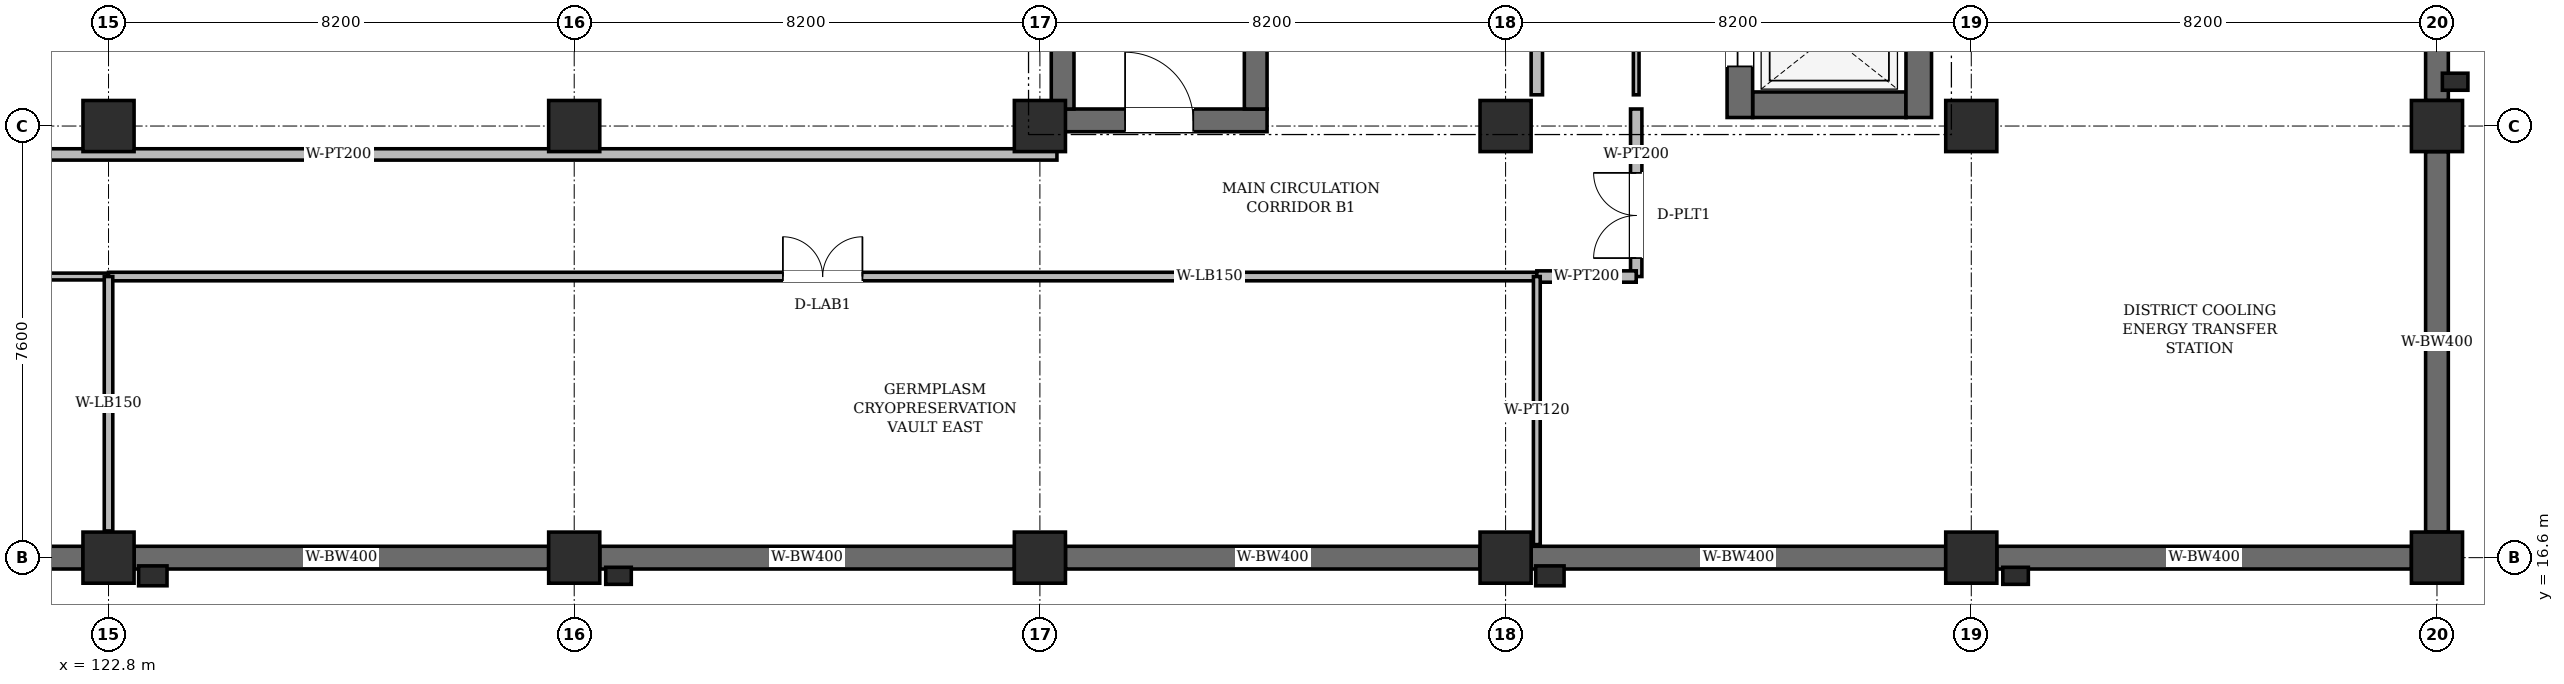
"""IFC4 building model, lengths in metres.
Left out: names, types, materials, properties, quantities, classifications, styles, units other than length and angle.
Written with IfcOpenShell. Run it as: python <this file> out.ifc"""

import sys

from ifc_helpers import new_model, si_unit, direction, frame, frame_2d, origin, origin_2d, place, context, subcontext, project, spatial, rectangle, extrude, element, fill, save


model = new_model("IFC4")
c1 = context("Model", 3, precision=1e-05, world=origin(), true_north=direction((0.0, 1.0)))
c2 = subcontext(c1, "Body", "Model", "MODEL_VIEW")
j1 = project(units=[si_unit("LENGTHUNIT", "METRE"), si_unit("PLANEANGLEUNIT", "RADIAN")], contexts=[c1])
p1 = place(None, origin())
s1 = spatial("IfcSite", under=j1, at=p1, CompositionType="ELEMENT")
p2 = place(p1, origin())
s2 = spatial("IfcBuilding", under=s1, at=p2, CompositionType="ELEMENT")
p3 = place(p2, frame((0.0, 0.0, -4.8)))
s3 = spatial("IfcBuildingStorey", under=s2, at=p3, CompositionType="ELEMENT", Elevation=-4.8)
for number, where, z_axis, x_axis in (
    (1, (122.8, 16.6, 0.0), (0.0, 0.0, 1.0), (1.0, 0.0, 0.0)),
    (2, (122.8, 24.2, 0.0), (0.0, 0.0, 1.0), (1.0, 0.0, 0.0)),
    (3, (131.0, 16.6, 0.0), (0.0, 0.0, 1.0), (1.0, 0.0, 0.0)),
    (4, (131.0, 24.2, 0.0), (0.0, 0.0, 1.0), (1.0, 0.0, 0.0)),
    (5, (139.2, 16.6, 0.0), (0.0, 0.0, 1.0), (1.0, 0.0, 0.0)),
    (6, (139.2, 24.2, 0.0), (0.0, 0.0, 1.0), (1.0, 0.0, 0.0)),
    (7, (147.4, 16.6, 0.0), (0.0, 0.0, 1.0), (1.0, 0.0, 0.0)),
    (8, (147.4, 24.2, 0.0), (0.0, 0.0, 1.0), (1.0, 0.0, 0.0)),
    (9, (155.6, 16.6, 0.0), (0.0, 0.0, 1.0), (1.0, 0.0, 0.0)),
    (10, (155.6, 24.2, 0.0), (0.0, 0.0, 1.0), (1.0, 0.0, 0.0)),
    (11, (163.8, 16.6, 0.0), (0.0, 0.0, 1.0), (1.0, 0.0, 0.0)),
    (12, (163.8, 24.2, 0.0), (0.0, 0.0, 1.0), (1.0, 0.0, 0.0)),
):
    element("IfcColumn", number, at=place(p3, frame(where, z_axis=z_axis, x_axis=x_axis)), inside=s3, PredefinedType="COLUMN", context=c2, shape_type="SweptSolid", body=[
        extrude(rectangle(XDim=0.9, YDim=0.9, at=origin_2d()), origin(), (0.0, 0.0, 1.0), 4.46),
    ])
p4 = place(p3, frame((123.58, 16.28, 0.0), z_axis=(0.0, 0.0, 1.0), x_axis=(1.0, 0.0, 0.0)))
e13 = element("IfcColumn", 13, at=p4, inside=s3, PredefinedType="PILASTER", context=c2, shape_type="SweptSolid", body=[
    extrude(rectangle(XDim=0.5, YDim=0.35, at=origin_2d()), origin(), (0.0, 0.0, 1.0), 4.565),
])
p5 = place(p3, frame((131.78, 16.28, 0.0), z_axis=(0.0, 0.0, 1.0), x_axis=(1.0, 0.0, 0.0)))
e14 = element("IfcColumn", 14, at=p5, inside=s3, PredefinedType="PILASTER", context=c2, shape_type="SweptSolid", body=[
    extrude(rectangle(XDim=0.45, YDim=0.3, at=origin_2d()), origin(), (0.0, 0.0, 1.0), 4.565),
])
p6 = place(p3, frame((148.18, 16.28, 0.0), z_axis=(0.0, 0.0, 1.0), x_axis=(1.0, 0.0, 0.0)))
e15 = element("IfcColumn", 15, at=p6, inside=s3, PredefinedType="PILASTER", context=c2, shape_type="SweptSolid", body=[
    extrude(rectangle(XDim=0.5, YDim=0.35, at=origin_2d()), origin(), (0.0, 0.0, 1.0), 4.565),
])
for number, where, z_axis, x_axis in (
    (16, (156.38, 16.28, 0.0), (0.0, 0.0, 1.0), (1.0, 0.0, 0.0)),
    (17, (164.12, 24.98, 0.0), (0.0, 0.0, 1.0), (1.0, 0.0, 0.0)),
):
    element("IfcColumn", number, at=place(p3, frame(where, z_axis=z_axis, x_axis=x_axis)), inside=s3, PredefinedType="PILASTER", context=c2, shape_type="SweptSolid", body=[
        extrude(rectangle(XDim=0.45, YDim=0.3, at=origin_2d()), origin(), (0.0, 0.0, 1.0), 4.565),
    ])
p7 = place(p3, frame((163.8, 17.05, 0.0), z_axis=(0.0, 0.0, 1.0), x_axis=(0.0, 1.0, 0.0)))
e18 = element("IfcWall", 18, at=p7, inside=s3, PredefinedType="SOLIDWALL", context=c2, shape_type="SweptSolid", body=[
    extrude(rectangle(XDim=6.7, YDim=0.4, at=frame_2d((3.35, 0.0))), origin(), (0.0, 0.0, 1.0), 4.46),
])
p8 = place(p3, frame((163.8, 24.65, 0.0), z_axis=(0.0, 0.0, 1.0), x_axis=(0.0, 1.0, 0.0)))
e19 = element("IfcWall", 19, at=p8, inside=s3, PredefinedType="SOLIDWALL", context=c2, shape_type="SweptSolid", body=[
    extrude(rectangle(XDim=6.7, YDim=0.4, at=frame_2d((3.35, 0.0))), origin(), (0.0, 0.0, 1.0), 4.46),
])
p9 = place(p3, frame((114.975, 16.6, 0.0), z_axis=(0.0, 0.0, 1.0), x_axis=(1.0, 0.0, 0.0)))
e20 = element("IfcWall", 20, at=p9, inside=s3, PredefinedType="SOLIDWALL", context=c2, shape_type="SweptSolid", body=[
    extrude(rectangle(XDim=7.375, YDim=0.4, at=frame_2d((3.688, 0.0))), origin(), (0.0, 0.0, 1.0), 4.46),
])
for number, where, z_axis, x_axis in (
    (21, (123.25, 16.6, 0.0), (0.0, 0.0, 1.0), (1.0, 0.0, 0.0)),
    (22, (131.45, 16.6, 0.0), (0.0, 0.0, 1.0), (1.0, 0.0, 0.0)),
    (23, (139.65, 16.6, 0.0), (0.0, 0.0, 1.0), (1.0, 0.0, 0.0)),
):
    element("IfcWall", number, at=place(p3, frame(where, z_axis=z_axis, x_axis=x_axis)), inside=s3, PredefinedType="SOLIDWALL", context=c2, shape_type="SweptSolid", body=[
        extrude(rectangle(XDim=7.3, YDim=0.4, at=frame_2d((3.65, 0.0))), origin(), (0.0, 0.0, 1.0), 4.46),
    ])
p10 = place(p3, frame((147.85, 16.6, 0.0), z_axis=(0.0, 0.0, 1.0), x_axis=(1.0, 0.0, 0.0)))
e24 = element("IfcWall", 24, at=p10, inside=s3, PredefinedType="SOLIDWALL", context=c2, shape_type="SweptSolid", body=[
    extrude(rectangle(XDim=7.3, YDim=0.4, at=frame_2d((3.65, 0.0))), origin(), (0.0, 0.0, 1.0), 4.46),
])
p11 = place(p3, frame((156.05, 16.6, 0.0), z_axis=(0.0, 0.0, 1.0), x_axis=(1.0, 0.0, 0.0)))
e25 = element("IfcWall", 25, at=p11, inside=s3, PredefinedType="SOLIDWALL", context=c2, shape_type="SweptSolid", body=[
    extrude(rectangle(XDim=7.3, YDim=0.4, at=frame_2d((3.65, 0.0))), origin(), (0.0, 0.0, 1.0), 4.46),
])
p12 = place(p3, frame((139.4, 24.3, 0.0), z_axis=(0.0, 0.0, 1.0), x_axis=(1.0, 0.0, 0.0)))
e26 = element("IfcWall", 26, at=p12, inside=s3, PredefinedType="SHEAR", context=c2, shape_type="SweptSolid", body=[
    extrude(rectangle(XDim=3.8, YDim=0.4, at=frame_2d((1.9, 0.0))), origin(), (0.0, 0.0, 1.0), 4.46),
])
p13 = place(p12, frame((1.3, 0.0, 0.0)))
e27 = element("IfcOpeningElement", 27, at=p13, cuts=e26, PredefinedType="OPENING", context=c2, shape_type="SweptSolid", body=[
    extrude(rectangle(XDim=1.2, YDim=2.2, at=frame_2d((0.6, 1.1))), frame((0.0, 0.212, 0.0), z_axis=(0.0, -1.0, 0.0), x_axis=(1.0, 0.0, 0.0)), (0.0, 0.0, 1.0), 0.424),
])
for number, where, z_axis, x_axis in (
    (28, (139.6, 24.5, 0.0), (0.0, 0.0, 1.0), (0.0, 1.0, 0.0)),
    (29, (143.0, 24.5, 0.0), (0.0, 0.0, 1.0), (0.0, 1.0, 0.0)),
):
    element("IfcWall", number, at=place(p3, frame(where, z_axis=z_axis, x_axis=x_axis)), inside=s3, PredefinedType="SHEAR", context=c2, shape_type="SweptSolid", body=[
        extrude(rectangle(XDim=7.0, YDim=0.4, at=frame_2d((3.5, 0.0))), origin(), (0.0, 0.0, 1.0), 4.46),
    ])
p14 = place(p3, frame((151.75, 24.575, 0.0), z_axis=(0.0, 0.0, 1.0), x_axis=(1.0, 0.0, 0.0)))
e30 = element("IfcWall", 30, at=p14, inside=s3, PredefinedType="SHEAR", context=c2, shape_type="SweptSolid", body=[
    extrude(rectangle(XDim=2.7, YDim=0.45, at=frame_2d((1.35, 0.0))), origin(), (0.0, 0.0, 1.0), 4.46),
])
p15 = place(p3, frame((151.525, 24.35, 0.0), z_axis=(0.0, 0.0, 1.0), x_axis=(0.0, 1.0, 0.0)))
e31 = element("IfcWall", 31, at=p15, inside=s3, PredefinedType="SHEAR", context=c2, shape_type="SweptSolid", body=[
    extrude(rectangle(XDim=2.9, YDim=0.45, at=frame_2d((1.45, 0.0))), origin(), (0.0, 0.0, 1.0), 4.46),
])
p16 = place(p15, frame((0.9, 0.0, 0.0)))
e32 = element("IfcOpeningElement", 32, at=p16, cuts=e31, PredefinedType="OPENING", context=c2, shape_type="SweptSolid", body=[
    extrude(rectangle(XDim=1.1, YDim=2.2, at=frame_2d((0.55, 1.1))), frame((0.0, 0.237, 0.0), z_axis=(0.0, -1.0, 0.0), x_axis=(1.0, 0.0, 0.0)), (0.0, 0.0, 1.0), 0.474),
])
p17 = place(p3, frame((154.675, 24.35, 0.0), z_axis=(0.0, 0.0, 1.0), x_axis=(0.0, 1.0, 0.0)))
e33 = element("IfcWall", 33, at=p17, inside=s3, PredefinedType="SHEAR", context=c2, shape_type="SweptSolid", body=[
    extrude(rectangle(XDim=2.9, YDim=0.45, at=frame_2d((1.45, 0.0))), origin(), (0.0, 0.0, 1.0), 4.46),
])
p18 = place(p3, frame((147.95, 31.75, 0.0), z_axis=(0.0, 0.0, 1.0), x_axis=(0.0, -1.0, 0.0)))
e34 = element("IfcWall", 34, at=p18, inside=s3, PredefinedType="PARTITIONING", context=c2, shape_type="SweptSolid", body=[
    extrude(rectangle(XDim=7.0, YDim=0.2, at=frame_2d((3.5, 0.0))), origin(), (0.0, 0.0, 1.0), 4.405),
])
p19 = place(p18, frame((2.75, 0.0, 0.0)))
e35 = element("IfcOpeningElement", 35, at=p19, cuts=e34, PredefinedType="OPENING", context=c2, shape_type="SweptSolid", body=[
    extrude(rectangle(XDim=1.5, YDim=2.2, at=frame_2d((0.75, 1.1))), frame((0.0, 0.112, 0.0), z_axis=(0.0, -1.0, 0.0), x_axis=(1.0, 0.0, 0.0)), (0.0, 0.0, 1.0), 0.224),
])
p20 = place(p3, frame((149.7, 24.75, 0.0), z_axis=(0.0, 0.0, 1.0), x_axis=(0.0, 1.0, 0.0)))
e36 = element("IfcWall", 36, at=p20, inside=s3, PredefinedType="PARTITIONING", context=c2, shape_type="SweptSolid", body=[
    extrude(rectangle(XDim=11.3, YDim=0.1, at=frame_2d((5.65, 0.0))), origin(), (0.0, 0.0, 1.0), 4.405),
])
p21 = place(p20, frame((4.75, 0.0, 0.0)))
e37 = element("IfcOpeningElement", 37, at=p21, cuts=e36, PredefinedType="OPENING", context=c2, shape_type="SweptSolid", body=[
    extrude(rectangle(XDim=1.8, YDim=2.4, at=frame_2d((0.9, 1.2))), frame((0.0, 0.062, 0.0), z_axis=(0.0, -1.0, 0.0), x_axis=(1.0, 0.0, 0.0)), (0.0, 0.0, 1.0), 0.124),
])
p22 = place(p3, frame((122.8, 21.55, 0.0), z_axis=(0.0, 0.0, 1.0), x_axis=(-1.0, 0.0, 0.0)))
e38 = element("IfcWall", 38, at=p22, inside=s3, PredefinedType="PARTITIONING", context=c2, shape_type="SweptSolid", body=[
    extrude(rectangle(XDim=24.0, YDim=0.12, at=frame_2d((12.0, 0.0))), origin(), (0.0, 0.0, 1.0), 3.885),
])
p23 = place(p22, frame((11.475, 0.0, 0.0)))
e39 = element("IfcOpeningElement", 39, at=p23, cuts=e38, PredefinedType="OPENING", context=c2, shape_type="SweptSolid", body=[
    extrude(rectangle(XDim=1.05, YDim=2.2, at=frame_2d((0.525, 1.1))), frame((0.0, 0.072, 0.0), z_axis=(0.0, -1.0, 0.0), x_axis=(1.0, 0.0, 0.0)), (0.0, 0.0, 1.0), 0.144),
])
p24 = place(p3, frame((147.95, 21.55, 0.0), z_axis=(0.0, 0.0, 1.0), x_axis=(-1.0, 0.0, 0.0)))
e40 = element("IfcWall", 40, at=p24, inside=s3, PredefinedType="PARTITIONING", context=c2, shape_type="SweptSolid", body=[
    extrude(rectangle(XDim=25.15, YDim=0.15, at=frame_2d((12.575, 0.0))), origin(), (0.0, 0.0, 1.0), 4.035),
])
p25 = place(p24, frame((11.875, 0.0, 0.0)))
e41 = element("IfcOpeningElement", 41, at=p25, cuts=e40, PredefinedType="OPENING", context=c2, shape_type="SweptSolid", body=[
    extrude(rectangle(XDim=1.4, YDim=2.2, at=frame_2d((0.7, 1.1))), frame((0.0, 0.087, 0.0), z_axis=(0.0, -1.0, 0.0), x_axis=(1.0, 0.0, 0.0)), (0.0, 0.0, 1.0), 0.174),
])
p26 = place(p3, frame((98.8, 23.7, 0.0), z_axis=(0.0, 0.0, 1.0), x_axis=(1.0, 0.0, 0.0)))
e42 = element("IfcWall", 42, at=p26, inside=s3, PredefinedType="PARTITIONING", context=c2, shape_type="SweptSolid", body=[
    extrude(rectangle(XDim=40.7, YDim=0.2, at=frame_2d((20.35, 0.0))), origin(), (0.0, 0.0, 1.0), 4.405),
])
p27 = place(p26, frame((19.55, 0.0, 0.0)))
e43 = element("IfcOpeningElement", 43, at=p27, cuts=e42, PredefinedType="OPENING", context=c2, shape_type="SweptSolid", body=[
    extrude(rectangle(XDim=1.6, YDim=2.3, at=frame_2d((0.8, 1.15))), frame((0.0, 0.112, 0.0), z_axis=(0.0, -1.0, 0.0), x_axis=(1.0, 0.0, 0.0)), (0.0, 0.0, 1.0), 0.224),
])
p28 = place(p3, frame((149.7, 24.5, 0.0), z_axis=(0.0, 0.0, 1.0), x_axis=(0.0, -1.0, 0.0)))
e44 = element("IfcWall", 44, at=p28, inside=s3, PredefinedType="PARTITIONING", context=c2, shape_type="SweptSolid", body=[
    extrude(rectangle(XDim=0.8, YDim=0.2, at=frame_2d((0.4, 0.0))), origin(), (0.0, 0.0, 1.0), 4.405),
])
p29 = place(p3, frame((149.7, 23.7, 0.0), z_axis=(0.0, 0.0, 1.0), x_axis=(0.0, -1.0, 0.0)))
e45 = element("IfcWall", 45, at=p29, inside=s3, PredefinedType="PARTITIONING", context=c2, shape_type="SweptSolid", body=[
    extrude(rectangle(XDim=2.15, YDim=0.2, at=frame_2d((1.075, 0.0))), origin(), (0.0, 0.0, 1.0), 4.405),
])
p30 = place(p29, frame((0.325, 0.0, 0.0)))
e46 = element("IfcOpeningElement", 46, at=p30, cuts=e45, PredefinedType="OPENING", context=c2, shape_type="SweptSolid", body=[
    extrude(rectangle(XDim=1.5, YDim=2.2, at=frame_2d((0.75, 1.1))), frame((0.0, 0.112, 0.0), z_axis=(0.0, -1.0, 0.0), x_axis=(1.0, 0.0, 0.0)), (0.0, 0.0, 1.0), 0.224),
])
p31 = place(p3, frame((149.7, 21.55, 0.0), z_axis=(0.0, 0.0, 1.0), x_axis=(-1.0, 0.0, 0.0)))
e47 = element("IfcWall", 47, at=p31, inside=s3, PredefinedType="PARTITIONING", context=c2, shape_type="SweptSolid", body=[
    extrude(rectangle(XDim=1.75, YDim=0.2, at=frame_2d((0.875, 0.0))), origin(), (0.0, 0.0, 1.0), 4.035),
])
p32 = place(p3, frame((122.8, 21.55, 0.0), z_axis=(0.0, 0.0, 1.0), x_axis=(0.0, -1.0, 0.0)))
e48 = element("IfcWall", 48, at=p32, inside=s3, PredefinedType="PARTITIONING", context=c2, shape_type="SweptSolid", body=[
    extrude(rectangle(XDim=4.48, YDim=0.15, at=frame_2d((2.24, 0.0))), origin(), (0.0, 0.0, 1.0), 3.595),
])
p33 = place(p3, frame((147.95, 21.55, 0.0), z_axis=(0.0, 0.0, 1.0), x_axis=(0.0, -1.0, 0.0)))
e49 = element("IfcWall", 49, at=p33, inside=s3, PredefinedType="PARTITIONING", context=c2, shape_type="SweptSolid", body=[
    extrude(rectangle(XDim=4.72, YDim=0.12, at=frame_2d((2.36, 0.0))), origin(), (0.0, 0.0, 1.0), 4.405),
])
p34 = place(p13, origin())
e50 = element("IfcDoor", 50, at=p34, inside=s3, OperationType="SINGLE_SWING_LEFT", PredefinedType="DOOR", context=c2, shape_type="SweptSolid", body=[
    extrude(rectangle(XDim=1.2, YDim=2.2, at=frame_2d((0.6, 1.1))), frame((0.0, 0.025, 0.0), z_axis=(0.0, -1.0, 0.0), x_axis=(1.0, 0.0, 0.0)), (0.0, 0.0, 1.0), 0.05),
])
fill(e27, e50)
p35 = place(p16, origin())
e51 = element("IfcDoor", 51, at=p35, inside=s3, OperationType="DOUBLE_DOOR_SLIDING", PredefinedType="DOOR", context=c2, shape_type="SweptSolid", body=[
    extrude(rectangle(XDim=1.1, YDim=2.2, at=frame_2d((0.55, 1.1))), frame((0.0, 0.025, 0.0), z_axis=(0.0, -1.0, 0.0), x_axis=(1.0, 0.0, 0.0)), (0.0, 0.0, 1.0), 0.05),
])
fill(e32, e51)
p36 = place(p25, frame((1.4, 0.0, 0.0), z_axis=(0.0, 0.0, 1.0), x_axis=(-1.0, 0.0, 0.0)))
e52 = element("IfcDoor", 52, at=p36, inside=s3, OperationType="DOUBLE_DOOR_SINGLE_SWING", PredefinedType="DOOR", context=c2, shape_type="SweptSolid", body=[
    extrude(rectangle(XDim=1.4, YDim=2.2, at=frame_2d((0.7, 1.1))), frame((0.0, 0.025, 0.0), z_axis=(0.0, -1.0, 0.0), x_axis=(1.0, 0.0, 0.0)), (0.0, 0.0, 1.0), 0.05),
])
fill(e41, e52)
p37 = place(p30, frame((1.5, 0.0, 0.0), z_axis=(0.0, 0.0, 1.0), x_axis=(-1.0, 0.0, 0.0)))
e53 = element("IfcDoor", 53, at=p37, inside=s3, OperationType="DOUBLE_DOOR_SINGLE_SWING", PredefinedType="DOOR", context=c2, shape_type="SweptSolid", body=[
    extrude(rectangle(XDim=1.5, YDim=2.2, at=frame_2d((0.75, 1.1))), frame((0.0, 0.025, 0.0), z_axis=(0.0, -1.0, 0.0), x_axis=(1.0, 0.0, 0.0)), (0.0, 0.0, 1.0), 0.05),
])
fill(e46, e53)
save(model, sys.argv[1])
